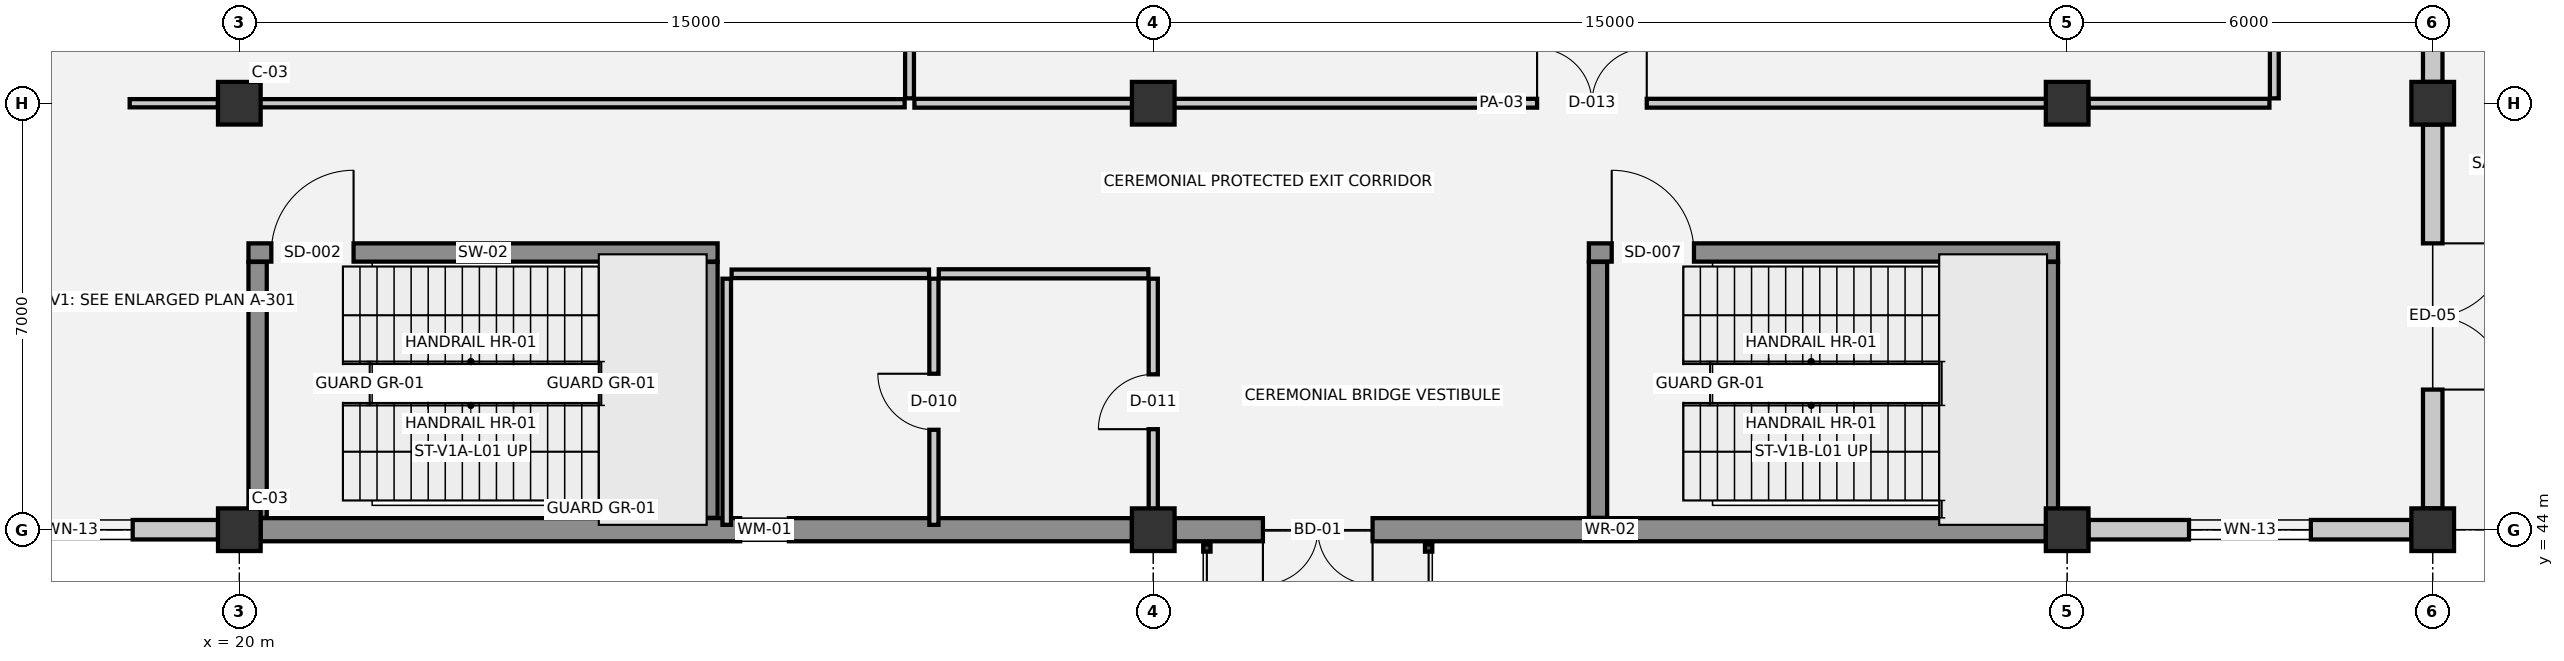
"""IFC4 building model, lengths in metres.
Left out: names, types, materials, properties, quantities, classifications, styles, units other than length and angle.
Written with IfcOpenShell. Run it as: python <this file> out.ifc"""

import sys

from ifc_helpers import new_model, si_unit, direction, frame, frame_2d, origin, origin_2d, place, context, subcontext, project, spatial, rectangle, extrude, element, fill, save


model = new_model("IFC4")
c1 = context("Model", 3, precision=1e-05, world=origin(), true_north=direction((0.0, 1.0)))
c2 = subcontext(c1, "Body", "Model", "MODEL_VIEW")
j1 = project(units=[si_unit("LENGTHUNIT", "METRE"), si_unit("PLANEANGLEUNIT", "RADIAN")], contexts=[c1])
p1 = place(None, origin())
s1 = spatial("IfcSite", under=j1, at=p1, CompositionType="ELEMENT")
p2 = place(p1, origin())
s2 = spatial("IfcBuilding", under=s1, at=p2, CompositionType="ELEMENT")
p3 = place(p2, origin())
s3 = spatial("IfcBuildingStorey", under=s2, at=p3, CompositionType="ELEMENT", Elevation=0.0)
for number, where, z_axis, x_axis in (
    (1, (20.0, 44.0, 0.0), (0.0, 0.0, 1.0), (1.0, 0.0, 0.0)),
    (2, (20.0, 51.0, 0.0), (0.0, 0.0, 1.0), (1.0, 0.0, 0.0)),
    (3, (35.0, 44.0, 0.0), (0.0, 0.0, 1.0), (1.0, 0.0, 0.0)),
    (4, (35.0, 51.0, 0.0), (0.0, 0.0, 1.0), (1.0, 0.0, 0.0)),
    (5, (50.0, 44.0, 0.0), (0.0, 0.0, 1.0), (1.0, 0.0, 0.0)),
    (6, (50.0, 51.0, 0.0), (0.0, 0.0, 1.0), (1.0, 0.0, 0.0)),
    (7, (56.0, 44.0, 0.0), (0.0, 0.0, 1.0), (1.0, 0.0, 0.0)),
    (8, (56.0, 51.0, 0.0), (0.0, 0.0, 1.0), (1.0, 0.0, 0.0)),
):
    element("IfcColumn", number, at=place(p3, frame(where, z_axis=z_axis, x_axis=x_axis)), inside=s3, PredefinedType="COLUMN", context=c2, shape_type="SweptSolid", body=[
        extrude(rectangle(XDim=0.7, YDim=0.7, at=origin_2d()), origin(), (0.0, 0.0, 1.0), 5.4),
    ])
p4 = place(p3, frame((56.0, 64.65, 0.0), z_axis=(0.0, 0.0, 1.0), x_axis=(0.0, -1.0, 0.0)))
e9 = element("IfcWall", 9, at=p4, inside=s3, PredefinedType="SOLIDWALL", context=c2, shape_type="SweptSolid", body=[
    extrude(rectangle(XDim=13.3, YDim=0.32, at=frame_2d((6.65, 0.0))), origin(), (0.0, 0.0, 1.0), 4.01),
])
p5 = place(p4, frame((5.65, 0.0, 0.9)))
e10 = element("IfcOpeningElement", 10, at=p5, cuts=e9, PredefinedType="OPENING", context=c2, shape_type="SweptSolid", body=[
    extrude(rectangle(XDim=2.0, YDim=2.2, at=frame_2d((1.0, 1.1))), frame((0.0, 0.17, 0.0), z_axis=(0.0, -1.0, 0.0), x_axis=(1.0, 0.0, 0.0)), (0.0, 0.0, 1.0), 0.34),
])
p6 = place(p3, frame((56.0, 50.65, 0.0), z_axis=(0.0, 0.0, 1.0), x_axis=(0.0, -1.0, 0.0)))
e11 = element("IfcWall", 11, at=p6, inside=s3, PredefinedType="SOLIDWALL", context=c2, shape_type="SweptSolid", body=[
    extrude(rectangle(XDim=6.3, YDim=0.32, at=frame_2d((3.15, 0.0))), origin(), (0.0, 0.0, 1.0), 4.01),
])
p7 = place(p6, frame((1.95, 0.0, 0.0)))
e12 = element("IfcOpeningElement", 12, at=p7, cuts=e11, PredefinedType="OPENING", context=c2, shape_type="SweptSolid", body=[
    extrude(rectangle(XDim=2.4, YDim=2.4, at=frame_2d((1.2, 1.2))), frame((0.0, 0.17, 0.0), z_axis=(0.0, -1.0, 0.0), x_axis=(1.0, 0.0, 0.0)), (0.0, 0.0, 1.0), 0.34),
])
p8 = place(p3, frame((55.65, 44.0, 0.0), z_axis=(0.0, 0.0, 1.0), x_axis=(-1.0, 0.0, 0.0)))
e13 = element("IfcWall", 13, at=p8, inside=s3, PredefinedType="SOLIDWALL", context=c2, shape_type="SweptSolid", body=[
    extrude(rectangle(XDim=5.3, YDim=0.32, at=frame_2d((2.65, 0.0))), origin(), (0.0, 0.0, 1.0), 4.01),
])
p9 = place(p8, frame((1.65, 0.0, 0.9)))
e14 = element("IfcOpeningElement", 14, at=p9, cuts=e13, PredefinedType="OPENING", context=c2, shape_type="SweptSolid", body=[
    extrude(rectangle(XDim=2.0, YDim=2.2, at=frame_2d((1.0, 1.1))), frame((0.0, 0.17, 0.0), z_axis=(0.0, -1.0, 0.0), x_axis=(1.0, 0.0, 0.0)), (0.0, 0.0, 1.0), 0.34),
])
p10 = place(p3, frame((49.65, 44.0, 0.0), z_axis=(0.0, 0.0, 1.0), x_axis=(-1.0, 0.0, 0.0)))
e15 = element("IfcWall", 15, at=p10, inside=s3, PredefinedType="STANDARD", context=c2, shape_type="SweptSolid", body=[
    extrude(rectangle(XDim=14.3, YDim=0.38, at=frame_2d((7.15, 0.0))), origin(), (0.0, 0.0, 1.0), 4.01),
])
p11 = place(p10, frame((11.05, 0.0, 0.0)))
e16 = element("IfcOpeningElement", 16, at=p11, cuts=e15, PredefinedType="OPENING", context=c2, shape_type="SweptSolid", body=[
    extrude(rectangle(XDim=1.8, YDim=2.25, at=frame_2d((0.9, 1.125))), frame((0.0, 0.2, 0.0), z_axis=(0.0, -1.0, 0.0), x_axis=(1.0, 0.0, 0.0)), (0.0, 0.0, 1.0), 0.4),
])
p12 = place(p3, frame((34.65, 44.0, 0.0), z_axis=(0.0, 0.0, 1.0), x_axis=(-1.0, 0.0, 0.0)))
e17 = element("IfcWall", 17, at=p12, inside=s3, PredefinedType="STANDARD", context=c2, shape_type="SweptSolid", body=[
    extrude(rectangle(XDim=14.3, YDim=0.38, at=frame_2d((7.15, 0.0))), origin(), (0.0, 0.0, 1.0), 4.01),
])
p13 = place(p12, frame((5.63, 0.0, 0.95)))
e18 = element("IfcOpeningElement", 18, at=p13, cuts=e17, PredefinedType="OPENING", context=c2, shape_type="SweptSolid", body=[
    extrude(rectangle(XDim=0.8, YDim=1.5, at=frame_2d((0.4, 0.75))), frame((0.0, 0.2, 0.0), z_axis=(0.0, -1.0, 0.0), x_axis=(1.0, 0.0, 0.0)), (0.0, 0.0, 1.0), 0.4),
])
p14 = place(p3, frame((19.65, 44.0, 0.0), z_axis=(0.0, 0.0, 1.0), x_axis=(-1.0, 0.0, 0.0)))
e19 = element("IfcWall", 19, at=p14, inside=s3, PredefinedType="SOLIDWALL", context=c2, shape_type="SweptSolid", body=[
    extrude(rectangle(XDim=4.8, YDim=0.32, at=frame_2d((2.4, 0.0))), origin(), (0.0, 0.0, 1.0), 4.01),
])
p15 = place(p14, frame((1.4, 0.0, 0.9)))
e20 = element("IfcOpeningElement", 20, at=p15, cuts=e19, PredefinedType="OPENING", context=c2, shape_type="SweptSolid", body=[
    extrude(rectangle(XDim=2.0, YDim=2.2, at=frame_2d((1.0, 1.1))), frame((0.0, 0.17, 0.0), z_axis=(0.0, -1.0, 0.0), x_axis=(1.0, 0.0, 0.0)), (0.0, 0.0, 1.0), 0.34),
])
p16 = place(p3, frame((20.15, 48.55, 0.0), z_axis=(0.0, 0.0, 1.0), x_axis=(1.0, 0.0, 0.0)))
e21 = element("IfcWall", 21, at=p16, inside=s3, PredefinedType="SHEAR", context=c2, shape_type="SweptSolid", body=[
    extrude(rectangle(XDim=7.7, YDim=0.3, at=frame_2d((3.85, 0.0))), origin(), (0.0, 0.0, 1.0), 5.14),
])
p17 = place(p16, frame((0.375, 0.0, 0.0)))
e22 = element("IfcOpeningElement", 22, at=p17, cuts=e21, PredefinedType="OPENING", context=c2, shape_type="SweptSolid", body=[
    extrude(rectangle(XDim=1.35, YDim=2.2, at=frame_2d((0.675, 1.1))), frame((0.0, 0.16, 0.0), z_axis=(0.0, -1.0, 0.0), x_axis=(1.0, 0.0, 0.0)), (0.0, 0.0, 1.0), 0.32),
])
for number, where, z_axis, x_axis in (
    (23, (20.3, 48.395, 0.0), (0.0, 0.0, 1.0), (0.0, -1.0, 0.0)),
    (24, (27.7, 44.195, 0.0), (0.0, 0.0, 1.0), (0.0, 1.0, 0.0)),
):
    element("IfcWall", number, at=place(p3, frame(where, z_axis=z_axis, x_axis=x_axis)), inside=s3, PredefinedType="SHEAR", context=c2, shape_type="SweptSolid", body=[
        extrude(rectangle(XDim=4.2, YDim=0.3, at=frame_2d((2.1, 0.0))), origin(), (0.0, 0.0, 1.0), 5.14),
    ])
p18 = place(p3, frame((42.15, 48.55, 0.0), z_axis=(0.0, 0.0, 1.0), x_axis=(1.0, 0.0, 0.0)))
e25 = element("IfcWall", 25, at=p18, inside=s3, PredefinedType="SHEAR", context=c2, shape_type="SweptSolid", body=[
    extrude(rectangle(XDim=7.7, YDim=0.3, at=frame_2d((3.85, 0.0))), origin(), (0.0, 0.0, 1.0), 5.14),
])
p19 = place(p18, frame((0.375, 0.0, 0.0)))
e26 = element("IfcOpeningElement", 26, at=p19, cuts=e25, PredefinedType="OPENING", context=c2, shape_type="SweptSolid", body=[
    extrude(rectangle(XDim=1.35, YDim=2.2, at=frame_2d((0.675, 1.1))), frame((0.0, 0.16, 0.0), z_axis=(0.0, -1.0, 0.0), x_axis=(1.0, 0.0, 0.0)), (0.0, 0.0, 1.0), 0.32),
])
for number, where, z_axis, x_axis in (
    (27, (42.3, 48.395, 0.0), (0.0, 0.0, 1.0), (0.0, -1.0, 0.0)),
    (28, (49.7, 44.195, 0.0), (0.0, 0.0, 1.0), (0.0, 1.0, 0.0)),
):
    element("IfcWall", number, at=place(p3, frame(where, z_axis=z_axis, x_axis=x_axis)), inside=s3, PredefinedType="SHEAR", context=c2, shape_type="SweptSolid", body=[
        extrude(rectangle(XDim=4.2, YDim=0.3, at=frame_2d((2.1, 0.0))), origin(), (0.0, 0.0, 1.0), 5.14),
    ])
p20 = place(p3, frame((28.08, 48.2, 0.0), z_axis=(0.0, 0.0, 1.0), x_axis=(1.0, 0.0, 0.0)))
e29 = element("IfcWall", 29, at=p20, inside=s3, PredefinedType="PLUMBINGWALL", context=c2, shape_type="SweptSolid", body=[
    extrude(rectangle(XDim=3.24, YDim=0.14, at=frame_2d((1.62, 0.0))), origin(), (0.0, 0.0, 1.0), 5.04),
])
p21 = place(p3, frame((31.48, 48.2, 0.0), z_axis=(0.0, 0.0, 1.0), x_axis=(1.0, 0.0, 0.0)))
e30 = element("IfcWall", 30, at=p21, inside=s3, PredefinedType="PARTITIONING", context=c2, shape_type="SweptSolid", body=[
    extrude(rectangle(XDim=3.44, YDim=0.15, at=frame_2d((1.72, 0.0))), origin(), (0.0, 0.0, 1.0), 5.04),
])
p22 = place(p3, frame((18.2, 51.0, 0.0), z_axis=(0.0, 0.0, 1.0), x_axis=(1.0, 0.0, 0.0)))
e31 = element("IfcWall", 31, at=p22, inside=s3, PredefinedType="PARTITIONING", context=c2, shape_type="SweptSolid", body=[
    extrude(rectangle(XDim=1.45, YDim=0.135, at=frame_2d((0.725, 0.0))), origin(), (0.0, 0.0, 1.0), 4.43),
])
p23 = place(p3, frame((19.65, 51.0, 0.0), z_axis=(0.0, 0.0, 1.0), x_axis=(1.0, 0.0, 0.0)))
e32 = element("IfcWall", 32, at=p23, inside=s3, PredefinedType="PARTITIONING", context=c2, shape_type="SweptSolid", body=[
    extrude(rectangle(XDim=11.27, YDim=0.135, at=frame_2d((5.635, 0.0))), origin(), (0.0, 0.0, 1.0), 4.18),
])
p24 = place(p3, frame((31.08, 51.0, 0.0), z_axis=(0.0, 0.0, 1.0), x_axis=(1.0, 0.0, 0.0)))
e33 = element("IfcWall", 33, at=p24, inside=s3, PredefinedType="PARTITIONING", context=c2, shape_type="SweptSolid", body=[
    extrude(rectangle(XDim=19.27, YDim=0.145, at=frame_2d((9.635, 0.0))), origin(), (0.0, 0.0, 1.0), 4.18),
])
p25 = place(p24, frame((10.22, 0.0, 0.0)))
e34 = element("IfcOpeningElement", 34, at=p25, cuts=e33, PredefinedType="OPENING", context=c2, shape_type="SweptSolid", body=[
    extrude(rectangle(XDim=1.8, YDim=2.3, at=frame_2d((0.9, 1.15))), frame((0.0, 0.083, 0.0), z_axis=(0.0, -1.0, 0.0), x_axis=(1.0, 0.0, 0.0)), (0.0, 0.0, 1.0), 0.165),
])
p26 = place(p3, frame((50.35, 51.0, 0.0), z_axis=(0.0, 0.0, 1.0), x_axis=(1.0, 0.0, 0.0)))
e35 = element("IfcWall", 35, at=p26, inside=s3, PredefinedType="PARTITIONING", context=c2, shape_type="SweptSolid", body=[
    extrude(rectangle(XDim=2.97, YDim=0.145, at=frame_2d((1.485, 0.0))), origin(), (0.0, 0.0, 1.0), 4.43),
])
p27 = place(p3, frame((28.0, 44.08, 0.0), z_axis=(0.0, 0.0, 1.0), x_axis=(0.0, 1.0, 0.0)))
e36 = element("IfcWall", 36, at=p27, inside=s3, PredefinedType="PLUMBINGWALL", context=c2, shape_type="SweptSolid", body=[
    extrude(rectangle(XDim=4.04, YDim=0.14, at=frame_2d((2.02, 0.0))), origin(), (0.0, 0.0, 1.0), 5.04),
])
p28 = place(p3, frame((31.0, 51.08, 0.0), z_axis=(0.0, 0.0, 1.0), x_axis=(0.0, 1.0, 0.0)))
e37 = element("IfcWall", 37, at=p28, inside=s3, PredefinedType="PARTITIONING", context=c2, shape_type="SweptSolid", body=[
    extrude(rectangle(XDim=13.84, YDim=0.145, at=frame_2d((6.92, 0.0))), origin(), (0.0, 0.0, 1.0), 5.04),
])
p29 = place(p3, frame((31.4, 44.08, 0.0), z_axis=(0.0, 0.0, 1.0), x_axis=(0.0, 1.0, 0.0)))
e38 = element("IfcWall", 38, at=p29, inside=s3, PredefinedType="PARTITIONING", context=c2, shape_type="SweptSolid", body=[
    extrude(rectangle(XDim=4.04, YDim=0.15, at=frame_2d((2.02, 0.0))), origin(), (0.0, 0.0, 1.0), 5.04),
])
p30 = place(p29, frame((1.56, 0.0, 0.0)))
e39 = element("IfcOpeningElement", 39, at=p30, cuts=e38, PredefinedType="OPENING", context=c2, shape_type="SweptSolid", body=[
    extrude(rectangle(XDim=0.92, YDim=2.1, at=frame_2d((0.46, 1.05))), frame((0.0, 0.085, 0.0), z_axis=(0.0, -1.0, 0.0), x_axis=(1.0, 0.0, 0.0)), (0.0, 0.0, 1.0), 0.17),
])
p31 = place(p3, frame((35.0, 44.08, 0.0), z_axis=(0.0, 0.0, 1.0), x_axis=(0.0, 1.0, 0.0)))
e40 = element("IfcWall", 40, at=p31, inside=s3, PredefinedType="PARTITIONING", context=c2, shape_type="SweptSolid", body=[
    extrude(rectangle(XDim=4.04, YDim=0.15, at=frame_2d((2.02, 0.0))), origin(), (0.0, 0.0, 1.0), 4.48),
])
p32 = place(p31, frame((1.57, 0.0, 0.0)))
e41 = element("IfcOpeningElement", 41, at=p32, cuts=e40, PredefinedType="OPENING", context=c2, shape_type="SweptSolid", body=[
    extrude(rectangle(XDim=0.9, YDim=2.15, at=frame_2d((0.45, 1.075))), frame((0.0, 0.085, 0.0), z_axis=(0.0, -1.0, 0.0), x_axis=(1.0, 0.0, 0.0)), (0.0, 0.0, 1.0), 0.17),
])
p33 = place(p3, frame((53.4, 51.08, 0.0), z_axis=(0.0, 0.0, 1.0), x_axis=(0.0, 1.0, 0.0)))
e42 = element("IfcWall", 42, at=p33, inside=s3, PredefinedType="PARTITIONING", context=c2, shape_type="SweptSolid", body=[
    extrude(rectangle(XDim=13.84, YDim=0.145, at=frame_2d((6.92, 0.0))), origin(), (0.0, 0.0, 1.0), 5.04),
])
p34 = place(p7, origin())
e43 = element("IfcDoor", 43, at=p34, inside=s3, OperationType="DOUBLE_DOOR_SINGLE_SWING", PredefinedType="DOOR", context=c2, shape_type="SweptSolid", body=[
    extrude(rectangle(XDim=2.4, YDim=2.4, at=frame_2d((1.2, 1.2))), frame((0.0, 0.025, 0.0), z_axis=(0.0, -1.0, 0.0), x_axis=(1.0, 0.0, 0.0)), (0.0, 0.0, 1.0), 0.05),
])
fill(e12, e43)
p35 = place(p9, origin())
e44 = element("IfcWindow", 44, at=p35, inside=s3, PartitioningType="SINGLE_PANEL", PredefinedType="WINDOW", context=c2, shape_type="SweptSolid", body=[
    extrude(rectangle(XDim=2.0, YDim=2.2, at=frame_2d((1.0, 1.1))), frame((0.0, 0.03, 0.0), z_axis=(0.0, -1.0, 0.0), x_axis=(1.0, 0.0, 0.0)), (0.0, 0.0, 1.0), 0.06),
])
fill(e14, e44)
p36 = place(p11, origin())
e45 = element("IfcDoor", 45, at=p36, inside=s3, OperationType="DOUBLE_DOOR_SINGLE_SWING", PredefinedType="DOOR", context=c2, shape_type="SweptSolid", body=[
    extrude(rectangle(XDim=1.8, YDim=2.25, at=frame_2d((0.9, 1.125))), frame((0.0, 0.025, 0.0), z_axis=(0.0, -1.0, 0.0), x_axis=(1.0, 0.0, 0.0)), (0.0, 0.0, 1.0), 0.05),
])
fill(e16, e45)
p37 = place(p15, origin())
e46 = element("IfcWindow", 46, at=p37, inside=s3, PartitioningType="SINGLE_PANEL", PredefinedType="WINDOW", context=c2, shape_type="SweptSolid", body=[
    extrude(rectangle(XDim=2.0, YDim=2.2, at=frame_2d((1.0, 1.1))), frame((0.0, 0.03, 0.0), z_axis=(0.0, -1.0, 0.0), x_axis=(1.0, 0.0, 0.0)), (0.0, 0.0, 1.0), 0.06),
])
fill(e20, e46)
p38 = place(p17, origin())
e47 = element("IfcDoor", 47, at=p38, inside=s3, OperationType="SINGLE_SWING_RIGHT", PredefinedType="DOOR", context=c2, shape_type="SweptSolid", body=[
    extrude(rectangle(XDim=1.35, YDim=2.2, at=frame_2d((0.675, 1.1))), frame((0.0, 0.025, 0.0), z_axis=(0.0, -1.0, 0.0), x_axis=(1.0, 0.0, 0.0)), (0.0, 0.0, 1.0), 0.05),
])
fill(e22, e47)
p39 = place(p19, origin())
e48 = element("IfcDoor", 48, at=p39, inside=s3, OperationType="SINGLE_SWING_LEFT", PredefinedType="DOOR", context=c2, shape_type="SweptSolid", body=[
    extrude(rectangle(XDim=1.35, YDim=2.2, at=frame_2d((0.675, 1.1))), frame((0.0, 0.025, 0.0), z_axis=(0.0, -1.0, 0.0), x_axis=(1.0, 0.0, 0.0)), (0.0, 0.0, 1.0), 0.05),
])
fill(e26, e48)
p40 = place(p30, origin())
e49 = element("IfcDoor", 49, at=p40, inside=s3, OperationType="SINGLE_SWING_RIGHT", PredefinedType="DOOR", context=c2, shape_type="SweptSolid", body=[
    extrude(rectangle(XDim=0.92, YDim=2.1, at=frame_2d((0.46, 1.05))), frame((0.0, 0.025, 0.0), z_axis=(0.0, -1.0, 0.0), x_axis=(1.0, 0.0, 0.0)), (0.0, 0.0, 1.0), 0.05),
])
fill(e39, e49)
p41 = place(p32, origin())
e50 = element("IfcDoor", 50, at=p41, inside=s3, OperationType="SINGLE_SWING_LEFT", PredefinedType="DOOR", context=c2, shape_type="SweptSolid", body=[
    extrude(rectangle(XDim=0.9, YDim=2.15, at=frame_2d((0.45, 1.075))), frame((0.0, 0.025, 0.0), z_axis=(0.0, -1.0, 0.0), x_axis=(1.0, 0.0, 0.0)), (0.0, 0.0, 1.0), 0.05),
])
fill(e41, e50)
p42 = place(p25, origin())
e51 = element("IfcDoor", 51, at=p42, inside=s3, OperationType="DOUBLE_DOOR_SINGLE_SWING", PredefinedType="DOOR", context=c2, shape_type="SweptSolid", body=[
    extrude(rectangle(XDim=1.8, YDim=2.3, at=frame_2d((0.9, 1.15))), frame((0.0, 0.025, 0.0), z_axis=(0.0, -1.0, 0.0), x_axis=(1.0, 0.0, 0.0)), (0.0, 0.0, 1.0), 0.05),
])
fill(e34, e51)
p43 = place(p13, origin())
e52 = element("IfcWindow", 52, at=p43, inside=s3, PartitioningType="SINGLE_PANEL", PredefinedType="WINDOW", context=c2, shape_type="SweptSolid", body=[
    extrude(rectangle(XDim=0.8, YDim=1.5, at=frame_2d((0.4, 0.75))), frame((0.0, 0.03, 0.0), z_axis=(0.0, -1.0, 0.0), x_axis=(1.0, 0.0, 0.0)), (0.0, 0.0, 1.0), 0.06),
])
fill(e18, e52)
save(model, sys.argv[1])
